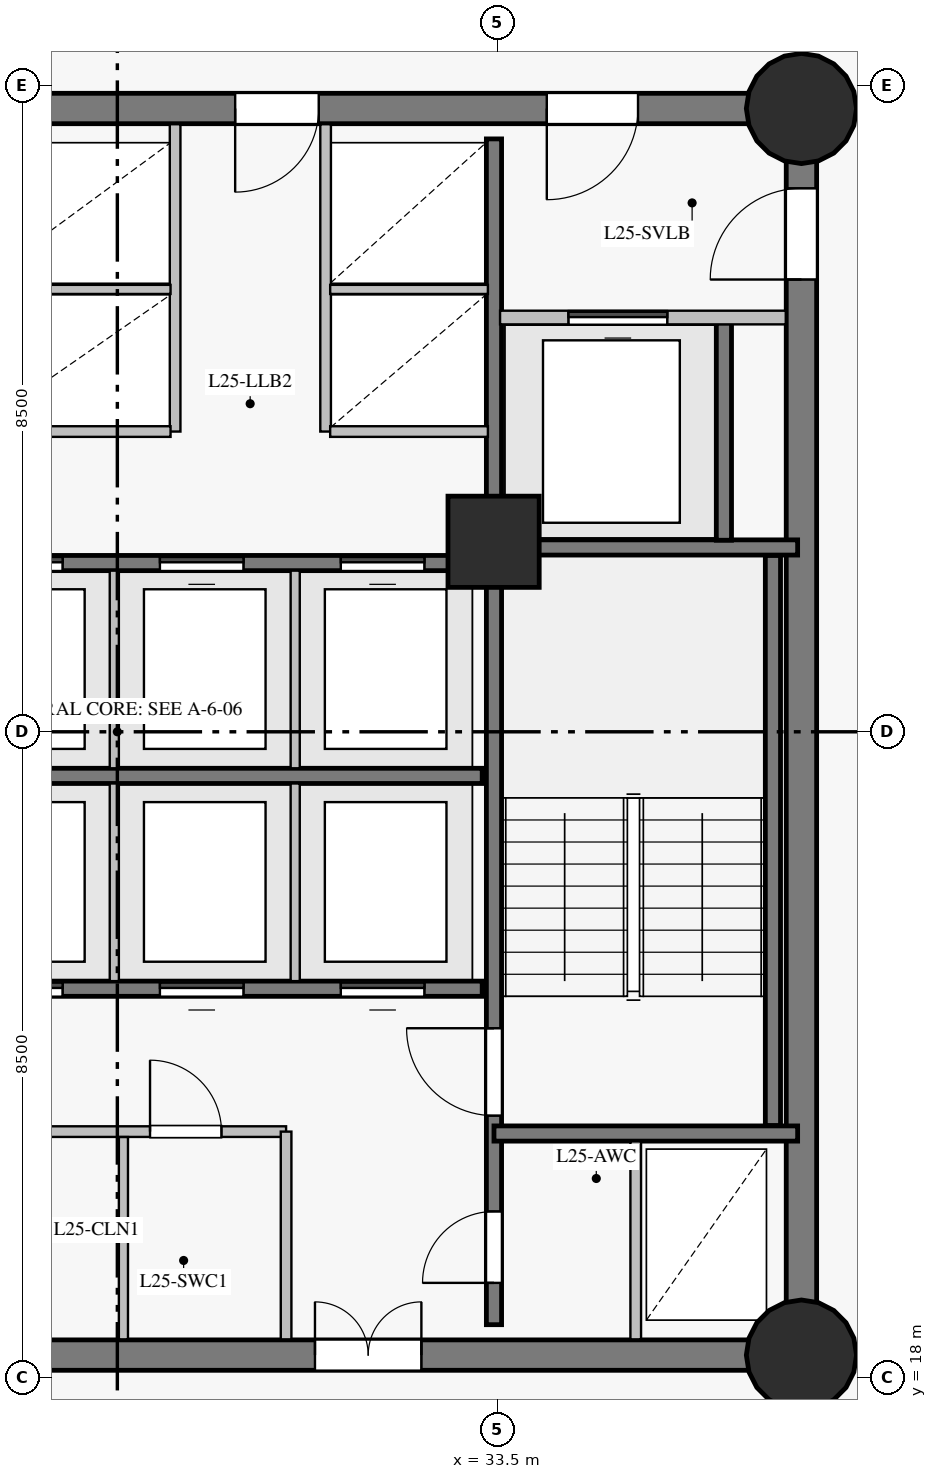
"""IFC4 building model, lengths in metres.
Left out: names, types, materials, properties, quantities, classifications, styles, units other than length and angle.
Written with IfcOpenShell. Run it as: python <this file> out.ifc"""

import sys

from ifc_helpers import new_model, si_unit, direction, frame, frame_2d, origin, origin_with_axes, origin_2d, place, context, subcontext, project, spatial, rectangle, circle, extrude, source, transform, mapped, element, fill, save


model = new_model("IFC4")
c1 = context("Model", 3, precision=1e-05, world=origin(), true_north=direction((0.0, 1.0)))
c2 = subcontext(c1, "Body", "Model", "MODEL_VIEW")
j1 = project(units=[si_unit("LENGTHUNIT", "METRE"), si_unit("PLANEANGLEUNIT", "RADIAN")], contexts=[c1])
p1 = place(None, origin())
s1 = spatial("IfcSite", under=j1, at=p1, CompositionType="ELEMENT")
p2 = place(p1, origin())
s2 = spatial("IfcBuilding", under=s1, at=p2, CompositionType="ELEMENT")
p3 = place(p2, frame((0.0, 0.0, 96.2)))
s3 = spatial("IfcBuildingStorey", under=s2, at=p3, CompositionType="ELEMENT", Elevation=96.2)
p4 = place(p3, frame((26.55, 18.3, 0.0), z_axis=(0.0, 0.0, 1.0), x_axis=(1.0, 0.0, 0.0)))
e1 = element("IfcWall", 1, at=p4, inside=s3, PredefinedType="SHEAR", context=c2, shape_type="SweptSolid", body=[
    extrude(rectangle(XDim=10.95, YDim=0.4, at=frame_2d((5.475, 0.0))), origin(), (0.0, 0.0, 1.0), 2.825),
])
p5 = place(p4, frame((4.55, 0.0, 0.0)))
e2 = element("IfcOpeningElement", 2, at=p5, cuts=e1, PredefinedType="OPENING", context=c2, shape_type="SweptSolid", body=[
    extrude(rectangle(XDim=1.4, YDim=2.2, at=frame_2d((0.7, 1.1))), frame((0.0, 0.21, 0.0), z_axis=(0.0, -1.0, 0.0), x_axis=(1.0, 0.0, 0.0)), (0.0, 0.0, 1.0), 0.42),
])
p6 = place(p3, frame((37.5, 18.3, 0.0), z_axis=(0.0, 0.0, 1.0), x_axis=(0.0, 1.0, 0.0)))
e3 = element("IfcWall", 3, at=p6, inside=s3, PredefinedType="SHEAR", context=c2, shape_type="SweptSolid", body=[
    extrude(rectangle(XDim=16.4, YDim=0.4, at=frame_2d((8.2, 0.0))), origin(), (0.0, 0.0, 1.0), 2.825),
])
p7 = place(p6, frame((14.15, 0.0, 0.0)))
e4 = element("IfcOpeningElement", 4, at=p7, cuts=e3, PredefinedType="OPENING", context=c2, shape_type="SweptSolid", body=[
    extrude(rectangle(XDim=1.2, YDim=2.15, at=frame_2d((0.6, 1.075))), frame((0.0, 0.21, 0.0), z_axis=(0.0, -1.0, 0.0), x_axis=(1.0, 0.0, 0.0)), (0.0, 0.0, 1.0), 0.42),
])
p8 = place(p3, frame((37.5, 34.7, 0.0), z_axis=(0.0, 0.0, 1.0), x_axis=(-1.0, 0.0, 0.0)))
e5 = element("IfcWall", 5, at=p8, inside=s3, PredefinedType="SHEAR", context=c2, shape_type="SweptSolid", body=[
    extrude(rectangle(XDim=10.95, YDim=0.4, at=frame_2d((5.475, 0.0))), origin(), (0.0, 0.0, 1.0), 2.825),
])
p9 = place(p8, frame((2.15, 0.0, 0.0)))
e6 = element("IfcOpeningElement", 6, at=p9, cuts=e5, PredefinedType="OPENING", context=c2, shape_type="SweptSolid", body=[
    extrude(rectangle(XDim=1.2, YDim=2.15, at=frame_2d((0.6, 1.075))), frame((0.0, 0.21, 0.0), z_axis=(0.0, -1.0, 0.0), x_axis=(1.0, 0.0, 0.0)), (0.0, 0.0, 1.0), 0.42),
])
p10 = place(p8, frame((6.35, 0.0, 0.0)))
e7 = element("IfcOpeningElement", 7, at=p10, cuts=e5, PredefinedType="OPENING", context=c2, shape_type="SweptSolid", body=[
    extrude(rectangle(XDim=1.1, YDim=2.15, at=frame_2d((0.55, 1.075))), frame((0.0, 0.21, 0.0), z_axis=(0.0, -1.0, 0.0), x_axis=(1.0, 0.0, 0.0)), (0.0, 0.0, 1.0), 0.42),
])
m1 = source(origin_with_axes(), c2, "Body", "SweptSolid", [
    extrude(circle(Radius=0.725, at=origin_2d()), origin(), (0.0, 0.0, 1.0), 3.05),
])
for number, where, z_axis, x_axis in (
    (8, (37.5, 18.3, 0.0), (0.0, 0.0, 1.0), (1.0, 0.0, 0.0)),
    (9, (37.5, 34.7, 0.0), (0.0, 0.0, 1.0), (1.0, 0.0, 0.0)),
):
    element("IfcColumn", number, at=place(p3, frame(where, z_axis=z_axis, x_axis=x_axis)), inside=s3, PredefinedType="COLUMN", context=c2, shape_type="MappedRepresentation", body=[
        mapped(m1, transform((0.0, 0.0, 0.0), scale=1.0)),
    ])
m2 = source(origin_with_axes(), c2, "Body", "SweptSolid", [
    extrude(rectangle(XDim=1.2, YDim=1.2, at=origin_2d()), origin(), (0.0, 0.0, 1.0), 3.05),
])
p11 = place(p3, frame((33.45, 29.0, 0.0), z_axis=(0.0, 0.0, 1.0), x_axis=(1.0, 0.0, 0.0)))
e10 = element("IfcColumn", 10, at=p11, inside=s3, PredefinedType="COLUMN", context=c2, shape_type="MappedRepresentation", body=[
    mapped(m2, transform((0.0, 0.0, 0.0), scale=1.0)),
])
p12 = place(p3, frame((33.455, 18.7, 0.0), z_axis=(0.0, 0.0, 1.0), x_axis=(0.0, 1.0, 0.0)))
e11 = element("IfcWall", 11, at=p12, inside=s3, PredefinedType="SHEAR", context=c2, shape_type="SweptSolid", body=[
    extrude(rectangle(XDim=15.6, YDim=0.2, at=frame_2d((7.8, 0.0))), origin(), (0.0, 0.0, 1.0), 2.825),
])
p13 = place(p12, frame((2.75, 0.0, 0.0)))
e12 = element("IfcOpeningElement", 12, at=p13, cuts=e11, PredefinedType="OPENING", context=c2, shape_type="SweptSolid", body=[
    extrude(rectangle(XDim=1.15, YDim=2.15, at=frame_2d((0.575, 1.075))), frame((0.0, 0.11, 0.0), z_axis=(0.0, -1.0, 0.0), x_axis=(1.0, 0.0, 0.0)), (0.0, 0.0, 1.0), 0.22),
])
p14 = place(p12, frame((0.55, 0.0, 0.0)))
e13 = element("IfcOpeningElement", 13, at=p14, cuts=e11, PredefinedType="OPENING", context=c2, shape_type="SweptSolid", body=[
    extrude(rectangle(XDim=0.94, YDim=2.1, at=frame_2d((0.47, 1.05))), frame((0.0, 0.11, 0.0), z_axis=(0.0, -1.0, 0.0), x_axis=(1.0, 0.0, 0.0)), (0.0, 0.0, 1.0), 0.22),
])
p15 = place(p3, frame((23.7, 23.12, 0.0), z_axis=(0.0, 0.0, 1.0), x_axis=(1.0, 0.0, 0.0)))
e14 = element("IfcWall", 14, at=p15, inside=s3, PredefinedType="SHEAR", context=c2, shape_type="SweptSolid", body=[
    extrude(rectangle(XDim=9.6, YDim=0.2, at=frame_2d((4.8, 0.0))), origin(), (0.0, 0.0, 1.0), 2.825),
])
p16 = place(p15, frame((0.6, 0.0, 0.0)))
e15 = element("IfcOpeningElement", 15, at=p16, cuts=e14, PredefinedType="OPENING", context=c2, shape_type="SweptSolid", body=[
    extrude(rectangle(XDim=1.1, YDim=2.15, at=frame_2d((0.55, 1.075))), frame((0.0, 0.11, 0.0), z_axis=(0.0, -1.0, 0.0), x_axis=(1.0, 0.0, 0.0)), (0.0, 0.0, 1.0), 0.22),
])
p17 = place(p15, frame((2.98, 0.0, 0.0)))
e16 = element("IfcOpeningElement", 16, at=p17, cuts=e14, PredefinedType="OPENING", context=c2, shape_type="SweptSolid", body=[
    extrude(rectangle(XDim=1.1, YDim=2.15, at=frame_2d((0.55, 1.075))), frame((0.0, 0.11, 0.0), z_axis=(0.0, -1.0, 0.0), x_axis=(1.0, 0.0, 0.0)), (0.0, 0.0, 1.0), 0.22),
])
p18 = place(p15, frame((5.36, 0.0, 0.0)))
e17 = element("IfcOpeningElement", 17, at=p18, cuts=e14, PredefinedType="OPENING", context=c2, shape_type="SweptSolid", body=[
    extrude(rectangle(XDim=1.1, YDim=2.15, at=frame_2d((0.55, 1.075))), frame((0.0, 0.11, 0.0), z_axis=(0.0, -1.0, 0.0), x_axis=(1.0, 0.0, 0.0)), (0.0, 0.0, 1.0), 0.22),
])
p19 = place(p15, frame((7.74, 0.0, 0.0)))
e18 = element("IfcOpeningElement", 18, at=p19, cuts=e14, PredefinedType="OPENING", context=c2, shape_type="SweptSolid", body=[
    extrude(rectangle(XDim=1.1, YDim=2.15, at=frame_2d((0.55, 1.075))), frame((0.0, 0.11, 0.0), z_axis=(0.0, -1.0, 0.0), x_axis=(1.0, 0.0, 0.0)), (0.0, 0.0, 1.0), 0.22),
])
p20 = place(p3, frame((23.7, 25.92, 0.0), z_axis=(0.0, 0.0, 1.0), x_axis=(1.0, 0.0, 0.0)))
e19 = element("IfcWall", 19, at=p20, inside=s3, PredefinedType="SHEAR", context=c2, shape_type="SweptSolid", body=[
    extrude(rectangle(XDim=9.6, YDim=0.2, at=frame_2d((4.8, 0.0))), origin(), (0.0, 0.0, 1.0), 2.825),
])
p21 = place(p3, frame((23.7, 28.72, 0.0), z_axis=(0.0, 0.0, 1.0), x_axis=(1.0, 0.0, 0.0)))
e20 = element("IfcWall", 20, at=p21, inside=s3, PredefinedType="SHEAR", context=c2, shape_type="SweptSolid", body=[
    extrude(rectangle(XDim=9.6, YDim=0.2, at=frame_2d((4.8, 0.0))), origin(), (0.0, 0.0, 1.0), 2.825),
])
p22 = place(p21, frame((0.6, 0.0, 0.0)))
e21 = element("IfcOpeningElement", 21, at=p22, cuts=e20, PredefinedType="OPENING", context=c2, shape_type="SweptSolid", body=[
    extrude(rectangle(XDim=1.1, YDim=2.15, at=frame_2d((0.55, 1.075))), frame((0.0, 0.11, 0.0), z_axis=(0.0, -1.0, 0.0), x_axis=(1.0, 0.0, 0.0)), (0.0, 0.0, 1.0), 0.22),
])
p23 = place(p21, frame((2.98, 0.0, 0.0)))
e22 = element("IfcOpeningElement", 22, at=p23, cuts=e20, PredefinedType="OPENING", context=c2, shape_type="SweptSolid", body=[
    extrude(rectangle(XDim=1.1, YDim=2.15, at=frame_2d((0.55, 1.075))), frame((0.0, 0.11, 0.0), z_axis=(0.0, -1.0, 0.0), x_axis=(1.0, 0.0, 0.0)), (0.0, 0.0, 1.0), 0.22),
])
p24 = place(p21, frame((5.36, 0.0, 0.0)))
e23 = element("IfcOpeningElement", 23, at=p24, cuts=e20, PredefinedType="OPENING", context=c2, shape_type="SweptSolid", body=[
    extrude(rectangle(XDim=1.1, YDim=2.15, at=frame_2d((0.55, 1.075))), frame((0.0, 0.11, 0.0), z_axis=(0.0, -1.0, 0.0), x_axis=(1.0, 0.0, 0.0)), (0.0, 0.0, 1.0), 0.22),
])
p25 = place(p21, frame((7.74, 0.0, 0.0)))
e24 = element("IfcOpeningElement", 24, at=p25, cuts=e20, PredefinedType="OPENING", context=c2, shape_type="SweptSolid", body=[
    extrude(rectangle(XDim=1.1, YDim=2.15, at=frame_2d((0.55, 1.075))), frame((0.0, 0.11, 0.0), z_axis=(0.0, -1.0, 0.0), x_axis=(1.0, 0.0, 0.0)), (0.0, 0.0, 1.0), 0.22),
])
p26 = place(p3, frame((37.125, 21.32, 0.0), z_axis=(0.0, 0.0, 1.0), x_axis=(0.0, 1.0, 0.0)))
e25 = element("IfcWall", 25, at=p26, inside=s3, PredefinedType="SHEAR", context=c2, shape_type="SweptSolid", body=[
    extrude(rectangle(XDim=7.5, YDim=0.2, at=frame_2d((3.75, 0.0))), origin(), (0.0, 0.0, 1.0), 2.825),
])
for number, where, z_axis, x_axis in (
    (26, (33.455, 21.215, 0.0), (0.0, 0.0, 1.0), (1.0, 0.0, 0.0)),
    (27, (33.455, 28.925, 0.0), (0.0, 0.0, 1.0), (1.0, 0.0, 0.0)),
):
    element("IfcWall", number, at=place(p3, frame(where, z_axis=z_axis, x_axis=x_axis)), inside=s3, PredefinedType="SHEAR", context=c2, shape_type="SweptSolid", body=[
        extrude(rectangle(XDim=3.995, YDim=0.2, at=frame_2d((1.998, 0.0))), origin(), (0.0, 0.0, 1.0), 2.825),
    ])
p27 = place(p3, frame((36.48, 29.02, 0.0), z_axis=(0.0, 0.0, 1.0), x_axis=(0.0, 1.0, 0.0)))
e28 = element("IfcWall", 28, at=p27, inside=s3, PredefinedType="SHEAR", context=c2, shape_type="SweptSolid", body=[
    extrude(rectangle(XDim=2.86, YDim=0.2, at=frame_2d((1.43, 0.0))), origin(), (0.0, 0.0, 1.0), 2.825),
])
for number, where, z_axis, x_axis in (
    (29, (29.26, 30.45, 0.0), (0.0, 0.0, 1.0), (0.0, 1.0, 0.0)),
    (30, (31.24, 30.45, 0.0), (0.0, 0.0, 1.0), (0.0, 1.0, 0.0)),
):
    element("IfcWall", number, at=place(p3, frame(where, z_axis=z_axis, x_axis=x_axis)), inside=s3, PredefinedType="PARTITIONING", context=c2, shape_type="SweptSolid", body=[
        extrude(rectangle(XDim=4.043, YDim=0.14, at=frame_2d((2.021, 0.0))), origin(), (0.0, 0.0, 1.0), 2.825),
    ])
p28 = place(p3, frame((33.535, 31.95, 0.0), z_axis=(0.0, 0.0, 1.0), x_axis=(1.0, 0.0, 0.0)))
e31 = element("IfcWall", 31, at=p28, inside=s3, PredefinedType="PARTITIONING", context=c2, shape_type="SweptSolid", body=[
    extrude(rectangle(XDim=3.759, YDim=0.18, at=frame_2d((1.879, 0.0))), origin(), (0.0, 0.0, 1.0), 2.825),
])
p29 = place(p28, frame((0.9, 0.0, 0.0)))
e32 = element("IfcOpeningElement", 32, at=p29, cuts=e31, PredefinedType="OPENING", context=c2, shape_type="SweptSolid", body=[
    extrude(rectangle(XDim=1.3, YDim=2.2, at=frame_2d((0.65, 1.1))), frame((0.0, 0.1, 0.0), z_axis=(0.0, -1.0, 0.0), x_axis=(1.0, 0.0, 0.0)), (0.0, 0.0, 1.0), 0.2),
])
p30 = place(p3, frame((27.28, 21.24, 0.0), z_axis=(0.0, 0.0, 1.0), x_axis=(1.0, 0.0, 0.0)))
e33 = element("IfcWall", 33, at=p30, inside=s3, PredefinedType="PARTITIONING", context=c2, shape_type="SweptSolid", body=[
    extrude(rectangle(XDim=3.44, YDim=0.14, at=frame_2d((1.72, 0.0))), origin(), (0.0, 0.0, 1.0), 2.825),
])
p31 = place(p30, frame((1.65, 0.0, 0.0)))
e34 = element("IfcOpeningElement", 34, at=p31, cuts=e33, PredefinedType="OPENING", context=c2, shape_type="SweptSolid", body=[
    extrude(rectangle(XDim=0.94, YDim=2.1, at=frame_2d((0.47, 1.05))), frame((0.0, 0.08, 0.0), z_axis=(0.0, -1.0, 0.0), x_axis=(1.0, 0.0, 0.0)), (0.0, 0.0, 1.0), 0.16),
])
p32 = place(p3, frame((30.72, 18.507, 0.0), z_axis=(0.0, 0.0, 1.0), x_axis=(0.0, 1.0, 0.0)))
e35 = element("IfcWall", 35, at=p32, inside=s3, PredefinedType="PARTITIONING", context=c2, shape_type="SweptSolid", body=[
    extrude(rectangle(XDim=2.733, YDim=0.14, at=frame_2d((1.366, 0.0))), origin(), (0.0, 0.0, 1.0), 2.825),
])
for number, where, z_axis, x_axis in (
    (36, (28.46, 23.22, 0.0), (0.0, 0.0, 1.0), (0.0, 1.0, 0.0)),
    (37, (30.84, 23.22, 0.0), (0.0, 0.0, 1.0), (0.0, 1.0, 0.0)),
    (38, (28.46, 26.02, 0.0), (0.0, 0.0, 1.0), (0.0, 1.0, 0.0)),
    (39, (30.84, 26.02, 0.0), (0.0, 0.0, 1.0), (0.0, 1.0, 0.0)),
):
    element("IfcWall", number, at=place(p3, frame(where, z_axis=z_axis, x_axis=x_axis)), inside=s3, PredefinedType="PARTITIONING", context=c2, shape_type="SweptSolid", body=[
        extrude(rectangle(XDim=2.6, YDim=0.12, at=frame_2d((1.3, 0.0))), origin(), (0.0, 0.0, 1.0), 2.825),
    ])
p33 = place(p3, frame((26.62, 30.45, 0.0), z_axis=(0.0, 0.0, 1.0), x_axis=(1.0, 0.0, 0.0)))
e40 = element("IfcWall", 40, at=p33, inside=s3, PredefinedType="PARTITIONING", context=c2, shape_type="SweptSolid", body=[
    extrude(rectangle(XDim=2.58, YDim=0.14, at=frame_2d((1.29, 0.0))), origin(), (0.0, 0.0, 1.0), 2.825),
])
p34 = place(p3, frame((26.62, 32.32, 0.0), z_axis=(0.0, 0.0, 1.0), x_axis=(1.0, 0.0, 0.0)))
e41 = element("IfcWall", 41, at=p34, inside=s3, PredefinedType="PARTITIONING", context=c2, shape_type="SweptSolid", body=[
    extrude(rectangle(XDim=2.58, YDim=0.12, at=frame_2d((1.29, 0.0))), origin(), (0.0, 0.0, 1.0), 2.825),
])
p35 = place(p3, frame((28.58, 18.507, 0.0), z_axis=(0.0, 0.0, 1.0), x_axis=(0.0, 1.0, 0.0)))
e42 = element("IfcWall", 42, at=p35, inside=s3, PredefinedType="PARTITIONING", context=c2, shape_type="SweptSolid", body=[
    extrude(rectangle(XDim=2.662, YDim=0.12, at=frame_2d((1.331, 0.0))), origin(), (0.0, 0.0, 1.0), 2.825),
])
p36 = place(p3, frame((35.32, 18.507, 0.0), z_axis=(0.0, 0.0, 1.0), x_axis=(0.0, 1.0, 0.0)))
e43 = element("IfcWall", 43, at=p36, inside=s3, PredefinedType="PARTITIONING", context=c2, shape_type="SweptSolid", body=[
    extrude(rectangle(XDim=2.604, YDim=0.14, at=frame_2d((1.302, 0.0))), origin(), (0.0, 0.0, 1.0), 2.825),
])
p37 = place(p3, frame((31.3, 30.45, 0.0), z_axis=(0.0, 0.0, 1.0), x_axis=(1.0, 0.0, 0.0)))
e44 = element("IfcWall", 44, at=p37, inside=s3, PredefinedType="PARTITIONING", context=c2, shape_type="SweptSolid", body=[
    extrude(rectangle(XDim=2.075, YDim=0.14, at=frame_2d((1.038, 0.0))), origin(), (0.0, 0.0, 1.0), 2.825),
])
p38 = place(p3, frame((31.3, 32.32, 0.0), z_axis=(0.0, 0.0, 1.0), x_axis=(1.0, 0.0, 0.0)))
e45 = element("IfcWall", 45, at=p38, inside=s3, PredefinedType="PARTITIONING", context=c2, shape_type="SweptSolid", body=[
    extrude(rectangle(XDim=2.075, YDim=0.12, at=frame_2d((1.038, 0.0))), origin(), (0.0, 0.0, 1.0), 2.825),
])
m3 = source(origin_with_axes(), c2, "Body", "SweptSolid", [
    extrude(rectangle(XDim=1.15, YDim=2.15, at=frame_2d((0.575, 1.075))), frame((0.0, 0.025, 0.0), z_axis=(0.0, -1.0, 0.0), x_axis=(1.0, 0.0, 0.0)), (0.0, 0.0, 1.0), 0.05),
])
p39 = place(p13, origin())
e46 = element("IfcDoor", 46, at=p39, inside=s3, OperationType="SINGLE_SWING_RIGHT", PredefinedType="DOOR", context=c2, shape_type="MappedRepresentation", body=[
    mapped(m3, transform((0.0, 0.0, 0.0), scale=1.0)),
])
fill(e12, e46)
m4 = source(origin_with_axes(), c2, "Body", "SweptSolid", [
    extrude(rectangle(XDim=1.2, YDim=2.15, at=frame_2d((0.6, 1.075))), frame((0.0, 0.025, 0.0), z_axis=(0.0, -1.0, 0.0), x_axis=(1.0, 0.0, 0.0)), (0.0, 0.0, 1.0), 0.05),
])
p40 = place(p7, origin())
e47 = element("IfcDoor", 47, at=p40, inside=s3, OperationType="SINGLE_SWING_LEFT", PredefinedType="DOOR", context=c2, shape_type="MappedRepresentation", body=[
    mapped(m4, transform((0.0, 0.0, 0.0), scale=1.0)),
])
fill(e4, e47)
p41 = place(p9, origin())
e48 = element("IfcDoor", 48, at=p41, inside=s3, OperationType="SINGLE_SWING_RIGHT", PredefinedType="DOOR", context=c2, shape_type="MappedRepresentation", body=[
    mapped(m4, transform((0.0, 0.0, 0.0), scale=1.0)),
])
fill(e6, e48)
m5 = source(origin_with_axes(), c2, "Body", "SweptSolid", [
    extrude(rectangle(XDim=1.3, YDim=2.2, at=frame_2d((0.65, 1.1))), frame((0.0, 0.025, 0.0), z_axis=(0.0, -1.0, 0.0), x_axis=(1.0, 0.0, 0.0)), (0.0, 0.0, 1.0), 0.05),
])
p42 = place(p29, origin())
e49 = element("IfcDoor", 49, at=p42, inside=s3, OperationType="SLIDING_TO_LEFT", PredefinedType="DOOR", context=c2, shape_type="MappedRepresentation", body=[
    mapped(m5, transform((0.0, 0.0, 0.0), scale=1.0)),
])
fill(e32, e49)
m6 = source(origin_with_axes(), c2, "Body", "SweptSolid", [
    extrude(rectangle(XDim=1.4, YDim=2.2, at=frame_2d((0.7, 1.1))), frame((0.0, 0.025, 0.0), z_axis=(0.0, -1.0, 0.0), x_axis=(1.0, 0.0, 0.0)), (0.0, 0.0, 1.0), 0.05),
])
p43 = place(p5, origin())
e50 = element("IfcDoor", 50, at=p43, inside=s3, OperationType="DOUBLE_DOOR_SINGLE_SWING", PredefinedType="DOOR", context=c2, shape_type="MappedRepresentation", body=[
    mapped(m6, transform((0.0, 0.0, 0.0), scale=1.0)),
])
fill(e2, e50)
m7 = source(origin_with_axes(), c2, "Body", "SweptSolid", [
    extrude(rectangle(XDim=0.94, YDim=2.1, at=frame_2d((0.47, 1.05))), frame((0.0, 0.025, 0.0), z_axis=(0.0, -1.0, 0.0), x_axis=(1.0, 0.0, 0.0)), (0.0, 0.0, 1.0), 0.05),
])
p44 = place(p14, origin())
e51 = element("IfcDoor", 51, at=p44, inside=s3, OperationType="SINGLE_SWING_LEFT", PredefinedType="DOOR", context=c2, shape_type="MappedRepresentation", body=[
    mapped(m7, transform((0.0, 0.0, 0.0), scale=1.0)),
])
fill(e13, e51)
p45 = place(p31, origin())
e52 = element("IfcDoor", 52, at=p45, inside=s3, OperationType="SINGLE_SWING_LEFT", PredefinedType="DOOR", context=c2, shape_type="MappedRepresentation", body=[
    mapped(m7, transform((0.0, 0.0, 0.0), scale=1.0)),
])
fill(e34, e52)
m8 = source(origin_with_axes(), c2, "Body", "SweptSolid", [
    extrude(rectangle(XDim=1.1, YDim=2.15, at=frame_2d((0.55, 1.075))), frame((0.0, 0.025, 0.0), z_axis=(0.0, -1.0, 0.0), x_axis=(1.0, 0.0, 0.0)), (0.0, 0.0, 1.0), 0.05),
])
p46 = place(p17, origin())
e53 = element("IfcDoor", 53, at=p46, inside=s3, OperationType="SLIDING_TO_RIGHT", PredefinedType="DOOR", context=c2, shape_type="MappedRepresentation", body=[
    mapped(m8, transform((0.0, 0.0, 0.0), scale=1.0)),
])
fill(e16, e53)
p47 = place(p18, origin())
e54 = element("IfcDoor", 54, at=p47, inside=s3, OperationType="SLIDING_TO_LEFT", PredefinedType="DOOR", context=c2, shape_type="MappedRepresentation", body=[
    mapped(m8, transform((0.0, 0.0, 0.0), scale=1.0)),
])
fill(e17, e54)
p48 = place(p19, origin())
e55 = element("IfcDoor", 55, at=p48, inside=s3, OperationType="SLIDING_TO_RIGHT", PredefinedType="DOOR", context=c2, shape_type="MappedRepresentation", body=[
    mapped(m8, transform((0.0, 0.0, 0.0), scale=1.0)),
])
fill(e18, e55)
p49 = place(p23, origin())
e56 = element("IfcDoor", 56, at=p49, inside=s3, OperationType="SLIDING_TO_RIGHT", PredefinedType="DOOR", context=c2, shape_type="MappedRepresentation", body=[
    mapped(m8, transform((0.0, 0.0, 0.0), scale=1.0)),
])
fill(e22, e56)
p50 = place(p24, origin())
e57 = element("IfcDoor", 57, at=p50, inside=s3, OperationType="SLIDING_TO_LEFT", PredefinedType="DOOR", context=c2, shape_type="MappedRepresentation", body=[
    mapped(m8, transform((0.0, 0.0, 0.0), scale=1.0)),
])
fill(e23, e57)
p51 = place(p25, origin())
e58 = element("IfcDoor", 58, at=p51, inside=s3, OperationType="SLIDING_TO_RIGHT", PredefinedType="DOOR", context=c2, shape_type="MappedRepresentation", body=[
    mapped(m8, transform((0.0, 0.0, 0.0), scale=1.0)),
])
fill(e24, e58)
p52 = place(p10, origin())
e59 = element("IfcDoor", 59, at=p52, inside=s3, OperationType="SINGLE_SWING_RIGHT", PredefinedType="DOOR", context=c2, shape_type="MappedRepresentation", body=[
    mapped(m8, transform((0.0, 0.0, 0.0), scale=1.0)),
])
fill(e7, e59)
save(model, sys.argv[1])
